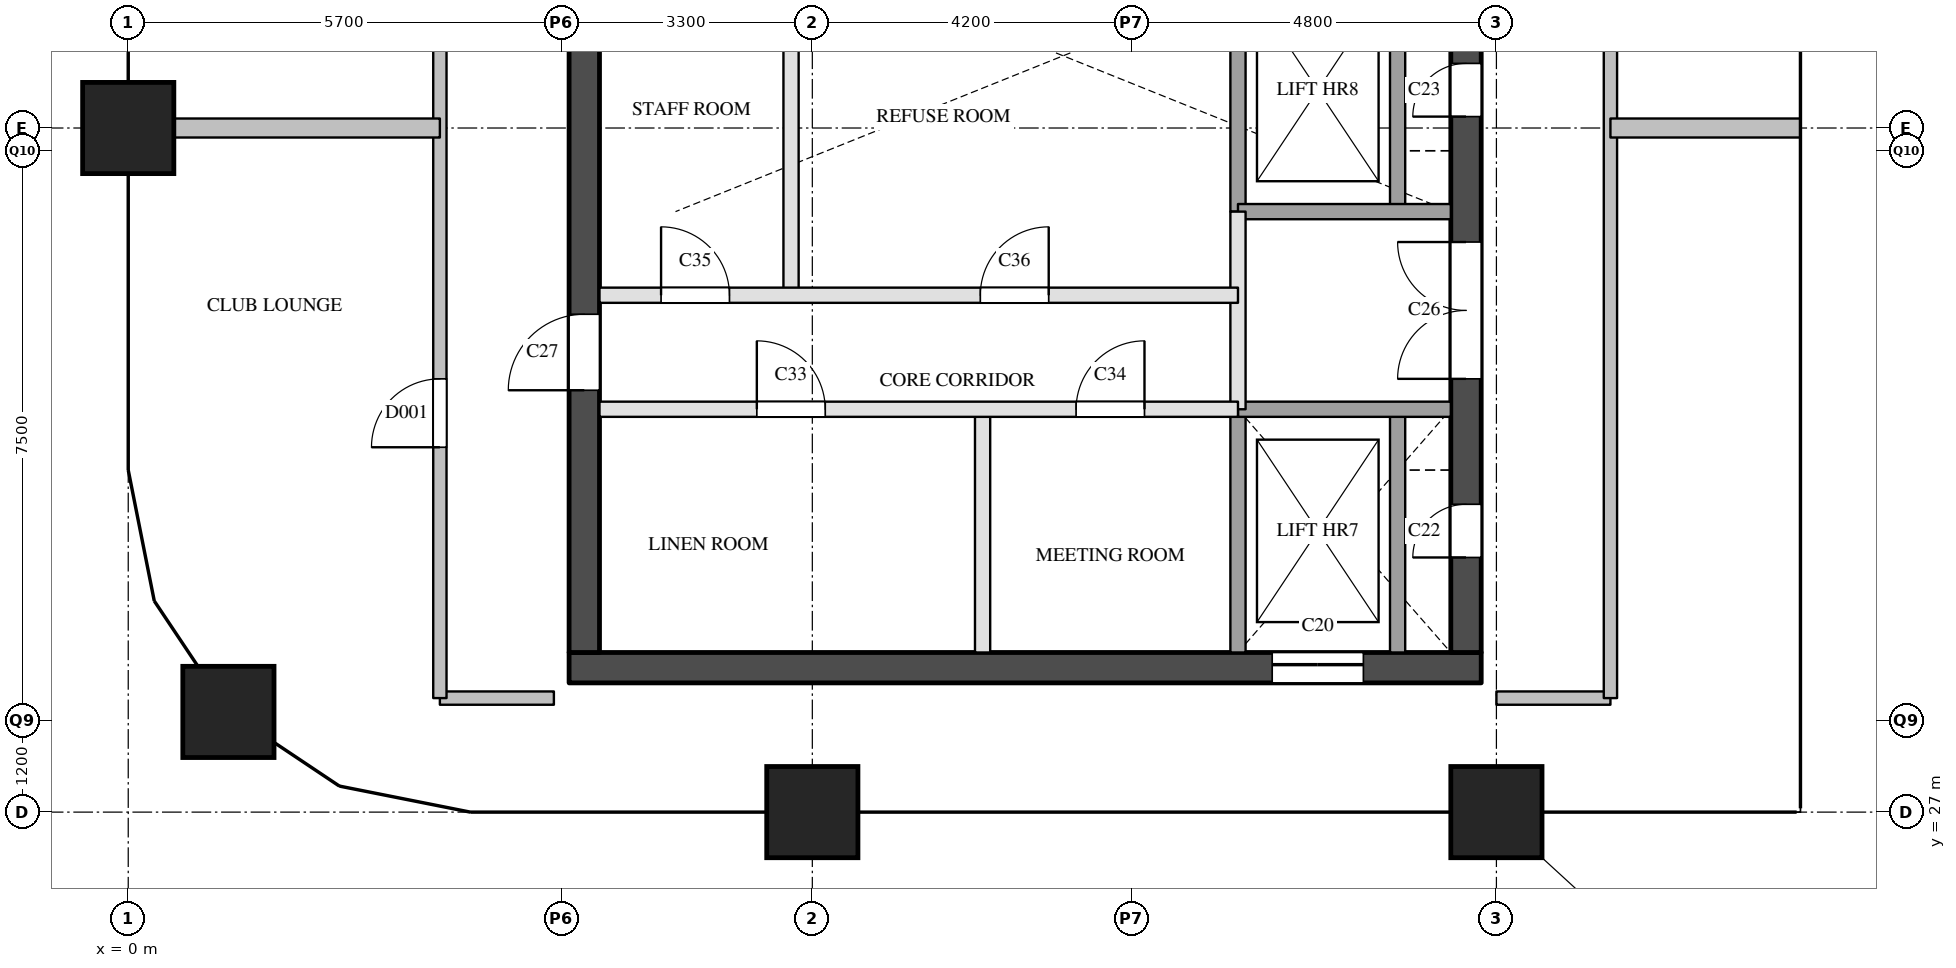
"""IFC4 building model, lengths in metres.
Left out: names, types, materials, properties, quantities, classifications, styles, units other than length and angle.
Written with IfcOpenShell. Run it as: python <this file> out.ifc"""

import sys

from ifc_helpers import new_model, si_unit, direction, frame, frame_2d, origin, origin_2d, place, context, subcontext, project, spatial, rectangle, extrude, element, fill, save


model = new_model("IFC4")
c1 = context("Model", 3, precision=1e-05, world=origin(), true_north=direction((0.0, 1.0)))
c2 = subcontext(c1, "Body", "Model", "MODEL_VIEW")
j1 = project(units=[si_unit("LENGTHUNIT", "METRE"), si_unit("PLANEANGLEUNIT", "RADIAN")], contexts=[c1])
p1 = place(None, origin())
s1 = spatial("IfcSite", under=j1, at=p1, CompositionType="ELEMENT")
p2 = place(p1, origin())
s2 = spatial("IfcBuilding", under=s1, at=p2, CompositionType="ELEMENT")
p3 = place(p2, frame((0.0, 0.0, 218.9)))
s3 = spatial("IfcBuildingStorey", under=s2, at=p3, CompositionType="ELEMENT", Elevation=218.9)
for number, where, z_axis, x_axis in (
    (1, (1.318, 28.318, 0.0), (0.0, 0.0, 1.0), (1.0, 0.0, 0.0)),
    (2, (0.0, 36.0, 0.0), (0.0, 0.0, 1.0), (1.0, 0.0, 0.0)),
    (3, (9.0, 27.0, 0.0), (0.0, 0.0, 1.0), (1.0, 0.0, 0.0)),
    (4, (18.0, 27.0, 0.0), (0.0, 0.0, 1.0), (1.0, 0.0, 0.0)),
):
    element("IfcColumn", number, at=place(p3, frame(where, z_axis=z_axis, x_axis=x_axis)), inside=s3, PredefinedType="COLUMN", context=c2, shape_type="SweptSolid", body=[
        extrude(rectangle(XDim=1.2, YDim=1.2, at=origin_2d()), origin(), (0.0, 0.0, 1.0), 3.9),
    ])
p4 = place(p3, frame((5.8, 28.9, 0.0), z_axis=(0.0, 0.0, 1.0), x_axis=(1.0, 0.0, 0.0)))
e5 = element("IfcWall", 5, at=p4, inside=s3, PredefinedType="SHEAR", context=c2, shape_type="SweptSolid", body=[
    extrude(rectangle(XDim=12.0, YDim=0.4, at=frame_2d((6.0, 0.0))), origin(), (0.0, 0.0, 1.0), 3.6),
])
p5 = place(p4, frame((9.25, 0.0, 0.0)))
e6 = element("IfcOpeningElement", 6, at=p5, cuts=e5, PredefinedType="OPENING", context=c2, shape_type="SweptSolid", body=[
    extrude(rectangle(XDim=1.2, YDim=2.1, at=frame_2d((0.6, 1.05))), frame((0.0, 0.21, 0.0), z_axis=(0.0, -1.0, 0.0), x_axis=(1.0, 0.0, 0.0)), (0.0, 0.0, 1.0), 0.42),
])
p6 = place(p3, frame((6.0, 29.1, 0.0), z_axis=(0.0, 0.0, 1.0), x_axis=(0.0, 1.0, 0.0)))
e7 = element("IfcWall", 7, at=p6, inside=s3, PredefinedType="SHEAR", context=c2, shape_type="SweptSolid", body=[
    extrude(rectangle(XDim=20.3, YDim=0.4, at=frame_2d((10.15, 0.0))), origin(), (0.0, 0.0, 1.0), 3.6),
])
p7 = place(p6, frame((3.45, 0.0, 0.0)))
e8 = element("IfcOpeningElement", 8, at=p7, cuts=e7, PredefinedType="OPENING", context=c2, shape_type="SweptSolid", body=[
    extrude(rectangle(XDim=1.0, YDim=2.1, at=frame_2d((0.5, 1.05))), frame((0.0, 0.21, 0.0), z_axis=(0.0, -1.0, 0.0), x_axis=(1.0, 0.0, 0.0)), (0.0, 0.0, 1.0), 0.42),
])
p8 = place(p6, frame((16.4, 0.0, 0.0)))
e9 = element("IfcOpeningElement", 9, at=p8, cuts=e7, PredefinedType="OPENING", context=c2, shape_type="SweptSolid", body=[
    extrude(rectangle(XDim=1.0, YDim=2.1, at=frame_2d((0.5, 1.05))), frame((0.0, 0.21, 0.0), z_axis=(0.0, -1.0, 0.0), x_axis=(1.0, 0.0, 0.0)), (0.0, 0.0, 1.0), 0.42),
])
p9 = place(p3, frame((17.6, 29.1, 0.0), z_axis=(0.0, 0.0, 1.0), x_axis=(0.0, 1.0, 0.0)))
e10 = element("IfcWall", 10, at=p9, inside=s3, PredefinedType="SHEAR", context=c2, shape_type="SweptSolid", body=[
    extrude(rectangle(XDim=20.3, YDim=0.4, at=frame_2d((10.15, 0.0))), origin(), (0.0, 0.0, 1.0), 3.6),
])
p10 = place(p9, frame((1.25, 0.0, 0.0)))
e11 = element("IfcOpeningElement", 11, at=p10, cuts=e10, PredefinedType="OPENING", context=c2, shape_type="SweptSolid", body=[
    extrude(rectangle(XDim=0.7, YDim=2.1, at=frame_2d((0.35, 1.05))), frame((0.0, 0.21, 0.0), z_axis=(0.0, -1.0, 0.0), x_axis=(1.0, 0.0, 0.0)), (0.0, 0.0, 1.0), 0.42),
])
p11 = place(p9, frame((7.05, 0.0, 0.0)))
e12 = element("IfcOpeningElement", 12, at=p11, cuts=e10, PredefinedType="OPENING", context=c2, shape_type="SweptSolid", body=[
    extrude(rectangle(XDim=0.7, YDim=2.1, at=frame_2d((0.35, 1.05))), frame((0.0, 0.21, 0.0), z_axis=(0.0, -1.0, 0.0), x_axis=(1.0, 0.0, 0.0)), (0.0, 0.0, 1.0), 0.42),
])
p12 = place(p9, frame((3.6, 0.0, 0.0)))
e13 = element("IfcOpeningElement", 13, at=p12, cuts=e10, PredefinedType="OPENING", context=c2, shape_type="SweptSolid", body=[
    extrude(rectangle(XDim=1.8, YDim=2.1, at=frame_2d((0.9, 1.05))), frame((0.0, 0.21, 0.0), z_axis=(0.0, -1.0, 0.0), x_axis=(1.0, 0.0, 0.0)), (0.0, 0.0, 1.0), 0.42),
])
p13 = place(p3, frame((8.72, 33.8, 0.0), z_axis=(0.0, 0.0, 1.0), x_axis=(0.0, 1.0, 0.0)))
e14 = element("IfcWall", 14, at=p13, inside=s3, PredefinedType="PARTITIONING", context=c2, shape_type="SweptSolid", body=[
    extrude(rectangle(XDim=4.3, YDim=0.2, at=frame_2d((2.15, 0.0))), origin(), (0.0, 0.0, 1.0), 3.6),
])
p14 = place(p3, frame((11.24, 29.1, 0.0), z_axis=(0.0, 0.0, 1.0), x_axis=(0.0, 1.0, 0.0)))
e15 = element("IfcWall", 15, at=p14, inside=s3, PredefinedType="PARTITIONING", context=c2, shape_type="SweptSolid", body=[
    extrude(rectangle(XDim=3.2, YDim=0.2, at=frame_2d((1.6, 0.0))), origin(), (0.0, 0.0, 1.0), 3.6),
])
p15 = place(p3, frame((14.6, 32.3, 0.0), z_axis=(0.0, 0.0, 1.0), x_axis=(0.0, 1.0, 0.0)))
e16 = element("IfcWall", 16, at=p15, inside=s3, PredefinedType="PARTITIONING", context=c2, shape_type="SweptSolid", body=[
    extrude(rectangle(XDim=2.6, YDim=0.2, at=frame_2d((1.3, 0.0))), origin(), (0.0, 0.0, 1.0), 3.6),
])
p16 = place(p3, frame((14.6, 29.1, 0.0), z_axis=(0.0, 0.0, 1.0), x_axis=(0.0, 1.0, 0.0)))
e17 = element("IfcWall", 17, at=p16, inside=s3, PredefinedType="SOLIDWALL", context=c2, shape_type="SweptSolid", body=[
    extrude(rectangle(XDim=3.2, YDim=0.2, at=frame_2d((1.6, 0.0))), origin(), (0.0, 0.0, 1.0), 3.6),
])
p17 = place(p3, frame((14.6, 34.9, 0.0), z_axis=(0.0, 0.0, 1.0), x_axis=(0.0, 1.0, 0.0)))
e18 = element("IfcWall", 18, at=p17, inside=s3, PredefinedType="SOLIDWALL", context=c2, shape_type="SweptSolid", body=[
    extrude(rectangle(XDim=3.2, YDim=0.2, at=frame_2d((1.6, 0.0))), origin(), (0.0, 0.0, 1.0), 3.6),
])
p18 = place(p3, frame((16.7, 29.1, 0.0), z_axis=(0.0, 0.0, 1.0), x_axis=(0.0, 1.0, 0.0)))
e19 = element("IfcWall", 19, at=p18, inside=s3, PredefinedType="SOLIDWALL", context=c2, shape_type="SweptSolid", body=[
    extrude(rectangle(XDim=3.2, YDim=0.2, at=frame_2d((1.6, 0.0))), origin(), (0.0, 0.0, 1.0), 3.6),
])
p19 = place(p3, frame((16.7, 34.9, 0.0), z_axis=(0.0, 0.0, 1.0), x_axis=(0.0, 1.0, 0.0)))
e20 = element("IfcWall", 20, at=p19, inside=s3, PredefinedType="SOLIDWALL", context=c2, shape_type="SweptSolid", body=[
    extrude(rectangle(XDim=3.2, YDim=0.2, at=frame_2d((1.6, 0.0))), origin(), (0.0, 0.0, 1.0), 3.6),
])
p20 = place(p3, frame((6.2, 32.3, 0.0), z_axis=(0.0, 0.0, 1.0), x_axis=(1.0, 0.0, 0.0)))
e21 = element("IfcWall", 21, at=p20, inside=s3, PredefinedType="PARTITIONING", context=c2, shape_type="SweptSolid", body=[
    extrude(rectangle(XDim=8.4, YDim=0.2, at=frame_2d((4.2, 0.0))), origin(), (0.0, 0.0, 1.0), 3.6),
])
p21 = place(p20, frame((2.07, 0.0, 0.0)))
e22 = element("IfcOpeningElement", 22, at=p21, cuts=e21, PredefinedType="OPENING", context=c2, shape_type="SweptSolid", body=[
    extrude(rectangle(XDim=0.9, YDim=2.1, at=frame_2d((0.45, 1.05))), frame((0.0, 0.11, 0.0), z_axis=(0.0, -1.0, 0.0), x_axis=(1.0, 0.0, 0.0)), (0.0, 0.0, 1.0), 0.22),
])
p22 = place(p20, frame((6.27, 0.0, 0.0)))
e23 = element("IfcOpeningElement", 23, at=p22, cuts=e21, PredefinedType="OPENING", context=c2, shape_type="SweptSolid", body=[
    extrude(rectangle(XDim=0.9, YDim=2.1, at=frame_2d((0.45, 1.05))), frame((0.0, 0.11, 0.0), z_axis=(0.0, -1.0, 0.0), x_axis=(1.0, 0.0, 0.0)), (0.0, 0.0, 1.0), 0.22),
])
p23 = place(p3, frame((14.6, 32.3, 0.0), z_axis=(0.0, 0.0, 1.0), x_axis=(1.0, 0.0, 0.0)))
e24 = element("IfcWall", 24, at=p23, inside=s3, PredefinedType="SOLIDWALL", context=c2, shape_type="SweptSolid", body=[
    extrude(rectangle(XDim=2.8, YDim=0.2, at=frame_2d((1.4, 0.0))), origin(), (0.0, 0.0, 1.0), 3.6),
])
p24 = place(p3, frame((6.2, 33.8, 0.0), z_axis=(0.0, 0.0, 1.0), x_axis=(1.0, 0.0, 0.0)))
e25 = element("IfcWall", 25, at=p24, inside=s3, PredefinedType="PARTITIONING", context=c2, shape_type="SweptSolid", body=[
    extrude(rectangle(XDim=8.4, YDim=0.2, at=frame_2d((4.2, 0.0))), origin(), (0.0, 0.0, 1.0), 3.6),
])
p25 = place(p24, frame((0.81, 0.0, 0.0)))
e26 = element("IfcOpeningElement", 26, at=p25, cuts=e25, PredefinedType="OPENING", context=c2, shape_type="SweptSolid", body=[
    extrude(rectangle(XDim=0.9, YDim=2.1, at=frame_2d((0.45, 1.05))), frame((0.0, 0.11, 0.0), z_axis=(0.0, -1.0, 0.0), x_axis=(1.0, 0.0, 0.0)), (0.0, 0.0, 1.0), 0.22),
])
p26 = place(p24, frame((5.01, 0.0, 0.0)))
e27 = element("IfcOpeningElement", 27, at=p26, cuts=e25, PredefinedType="OPENING", context=c2, shape_type="SweptSolid", body=[
    extrude(rectangle(XDim=0.9, YDim=2.1, at=frame_2d((0.45, 1.05))), frame((0.0, 0.11, 0.0), z_axis=(0.0, -1.0, 0.0), x_axis=(1.0, 0.0, 0.0)), (0.0, 0.0, 1.0), 0.22),
])
p27 = place(p3, frame((14.6, 34.9, 0.0), z_axis=(0.0, 0.0, 1.0), x_axis=(1.0, 0.0, 0.0)))
e28 = element("IfcWall", 28, at=p27, inside=s3, PredefinedType="SOLIDWALL", context=c2, shape_type="SweptSolid", body=[
    extrude(rectangle(XDim=2.8, YDim=0.2, at=frame_2d((1.4, 0.0))), origin(), (0.0, 0.0, 1.0), 3.6),
])
for number, where, z_axis, x_axis in (
    (29, (4.1, 28.5, 0.0), (0.0, 0.0, 1.0), (1.0, 0.0, 0.0)),
    (30, (18.0, 28.5, 0.0), (0.0, 0.0, 1.0), (1.0, 0.0, 0.0)),
):
    element("IfcWall", number, at=place(p3, frame(where, z_axis=z_axis, x_axis=x_axis)), inside=s3, PredefinedType="PARTITIONING", context=c2, shape_type="SweptSolid", body=[
        extrude(rectangle(XDim=1.5, YDim=0.175, at=frame_2d((0.75, 0.0))), origin(), (0.0, 0.0, 1.0), 3.6),
    ])
p28 = place(p3, frame((4.1, 28.5, 0.0), z_axis=(0.0, 0.0, 1.0), x_axis=(0.0, 1.0, 0.0)))
e31 = element("IfcWall", 31, at=p28, inside=s3, PredefinedType="PARTITIONING", context=c2, shape_type="SweptSolid", body=[
    extrude(rectangle(XDim=23.0, YDim=0.175, at=frame_2d((11.5, 0.0))), origin(), (0.0, 0.0, 1.0), 3.6),
])
p29 = place(p28, frame((3.3, 0.0, 0.0)))
e32 = element("IfcOpeningElement", 32, at=p29, cuts=e31, PredefinedType="OPENING", context=c2, shape_type="SweptSolid", body=[
    extrude(rectangle(XDim=0.9, YDim=2.1, at=frame_2d((0.45, 1.05))), frame((0.0, 0.097, 0.0), z_axis=(0.0, -1.0, 0.0), x_axis=(1.0, 0.0, 0.0)), (0.0, 0.0, 1.0), 0.195),
])
p30 = place(p28, frame((14.8, 0.0, 0.0)))
e33 = element("IfcOpeningElement", 33, at=p30, cuts=e31, PredefinedType="OPENING", context=c2, shape_type="SweptSolid", body=[
    extrude(rectangle(XDim=0.9, YDim=2.1, at=frame_2d((0.45, 1.05))), frame((0.0, 0.097, 0.0), z_axis=(0.0, -1.0, 0.0), x_axis=(1.0, 0.0, 0.0)), (0.0, 0.0, 1.0), 0.195),
])
p31 = place(p3, frame((19.5, 28.5, 0.0), z_axis=(0.0, 0.0, 1.0), x_axis=(0.0, 1.0, 0.0)))
e34 = element("IfcWall", 34, at=p31, inside=s3, PredefinedType="PARTITIONING", context=c2, shape_type="SweptSolid", body=[
    extrude(rectangle(XDim=15.75, YDim=0.175, at=frame_2d((7.875, 0.0))), origin(), (0.0, 0.0, 1.0), 3.6),
])
p32 = place(p31, frame((11.125, 0.0, 0.0)))
e35 = element("IfcOpeningElement", 35, at=p32, cuts=e34, PredefinedType="OPENING", context=c2, shape_type="SweptSolid", body=[
    extrude(rectangle(XDim=1.0, YDim=2.1, at=frame_2d((0.5, 1.05))), frame((0.0, 0.097, 0.0), z_axis=(0.0, -1.0, 0.0), x_axis=(1.0, 0.0, 0.0)), (0.0, 0.0, 1.0), 0.195),
])
p33 = place(p3, frame((0.0, 36.0, 0.0), z_axis=(0.0, 0.0, 1.0), x_axis=(1.0, 0.0, 0.0)))
e36 = element("IfcWall", 36, at=p33, inside=s3, PredefinedType="PARTITIONING", context=c2, shape_type="SweptSolid", body=[
    extrude(rectangle(XDim=4.1, YDim=0.25, at=frame_2d((2.05, 0.0))), origin(), (0.0, 0.0, 1.0), 3.6),
])
p34 = place(p3, frame((19.5, 36.0, 0.0), z_axis=(0.0, 0.0, 1.0), x_axis=(1.0, 0.0, 0.0)))
e37 = element("IfcWall", 37, at=p34, inside=s3, PredefinedType="PARTITIONING", context=c2, shape_type="SweptSolid", body=[
    extrude(rectangle(XDim=2.5, YDim=0.25, at=frame_2d((1.25, 0.0))), origin(), (0.0, 0.0, 1.0), 3.6),
])
p35 = place(p5, origin())
e38 = element("IfcDoor", 38, at=p35, inside=s3, OperationType="SLIDING_TO_LEFT", PredefinedType="DOOR", context=c2, shape_type="SweptSolid", body=[
    extrude(rectangle(XDim=1.2, YDim=2.1, at=frame_2d((0.6, 1.05))), frame((0.0, 0.025, 0.0), z_axis=(0.0, -1.0, 0.0), x_axis=(1.0, 0.0, 0.0)), (0.0, 0.0, 1.0), 0.05),
])
fill(e6, e38)
p36 = place(p10, origin())
e39 = element("IfcDoor", 39, at=p36, inside=s3, OperationType="SINGLE_SWING_LEFT", PredefinedType="DOOR", context=c2, shape_type="SweptSolid", body=[
    extrude(rectangle(XDim=0.7, YDim=2.1, at=frame_2d((0.35, 1.05))), frame((0.0, 0.025, 0.0), z_axis=(0.0, -1.0, 0.0), x_axis=(1.0, 0.0, 0.0)), (0.0, 0.0, 1.0), 0.05),
])
fill(e11, e39)
p37 = place(p11, origin())
e40 = element("IfcDoor", 40, at=p37, inside=s3, OperationType="SINGLE_SWING_LEFT", PredefinedType="DOOR", context=c2, shape_type="SweptSolid", body=[
    extrude(rectangle(XDim=0.7, YDim=2.1, at=frame_2d((0.35, 1.05))), frame((0.0, 0.025, 0.0), z_axis=(0.0, -1.0, 0.0), x_axis=(1.0, 0.0, 0.0)), (0.0, 0.0, 1.0), 0.05),
])
fill(e12, e40)
p38 = place(p12, origin())
e41 = element("IfcDoor", 41, at=p38, inside=s3, OperationType="DOUBLE_DOOR_SINGLE_SWING", PredefinedType="DOOR", context=c2, shape_type="SweptSolid", body=[
    extrude(rectangle(XDim=1.8, YDim=2.1, at=frame_2d((0.9, 1.05))), frame((0.0, 0.025, 0.0), z_axis=(0.0, -1.0, 0.0), x_axis=(1.0, 0.0, 0.0)), (0.0, 0.0, 1.0), 0.05),
])
fill(e13, e41)
p39 = place(p7, origin())
e42 = element("IfcDoor", 42, at=p39, inside=s3, OperationType="SINGLE_SWING_LEFT", PredefinedType="DOOR", context=c2, shape_type="SweptSolid", body=[
    extrude(rectangle(XDim=1.0, YDim=2.1, at=frame_2d((0.5, 1.05))), frame((0.0, 0.025, 0.0), z_axis=(0.0, -1.0, 0.0), x_axis=(1.0, 0.0, 0.0)), (0.0, 0.0, 1.0), 0.05),
])
fill(e8, e42)
p40 = place(p21, origin())
e43 = element("IfcDoor", 43, at=p40, inside=s3, OperationType="SINGLE_SWING_LEFT", PredefinedType="DOOR", context=c2, shape_type="SweptSolid", body=[
    extrude(rectangle(XDim=0.9, YDim=2.1, at=frame_2d((0.45, 1.05))), frame((0.0, 0.025, 0.0), z_axis=(0.0, -1.0, 0.0), x_axis=(1.0, 0.0, 0.0)), (0.0, 0.0, 1.0), 0.05),
])
fill(e22, e43)
p41 = place(p22, origin())
e44 = element("IfcDoor", 44, at=p41, inside=s3, OperationType="SINGLE_SWING_RIGHT", PredefinedType="DOOR", context=c2, shape_type="SweptSolid", body=[
    extrude(rectangle(XDim=0.9, YDim=2.1, at=frame_2d((0.45, 1.05))), frame((0.0, 0.025, 0.0), z_axis=(0.0, -1.0, 0.0), x_axis=(1.0, 0.0, 0.0)), (0.0, 0.0, 1.0), 0.05),
])
fill(e23, e44)
p42 = place(p25, origin())
e45 = element("IfcDoor", 45, at=p42, inside=s3, OperationType="SINGLE_SWING_LEFT", PredefinedType="DOOR", context=c2, shape_type="SweptSolid", body=[
    extrude(rectangle(XDim=0.9, YDim=2.1, at=frame_2d((0.45, 1.05))), frame((0.0, 0.025, 0.0), z_axis=(0.0, -1.0, 0.0), x_axis=(1.0, 0.0, 0.0)), (0.0, 0.0, 1.0), 0.05),
])
fill(e26, e45)
p43 = place(p26, origin())
e46 = element("IfcDoor", 46, at=p43, inside=s3, OperationType="SINGLE_SWING_RIGHT", PredefinedType="DOOR", context=c2, shape_type="SweptSolid", body=[
    extrude(rectangle(XDim=0.9, YDim=2.1, at=frame_2d((0.45, 1.05))), frame((0.0, 0.025, 0.0), z_axis=(0.0, -1.0, 0.0), x_axis=(1.0, 0.0, 0.0)), (0.0, 0.0, 1.0), 0.05),
])
fill(e27, e46)
p44 = place(p29, origin())
e47 = element("IfcDoor", 47, at=p44, inside=s3, OperationType="SINGLE_SWING_LEFT", PredefinedType="DOOR", context=c2, shape_type="SweptSolid", body=[
    extrude(rectangle(XDim=0.9, YDim=2.1, at=frame_2d((0.45, 1.05))), frame((0.0, 0.025, 0.0), z_axis=(0.0, -1.0, 0.0), x_axis=(1.0, 0.0, 0.0)), (0.0, 0.0, 1.0), 0.05),
])
fill(e32, e47)
save(model, sys.argv[1])
